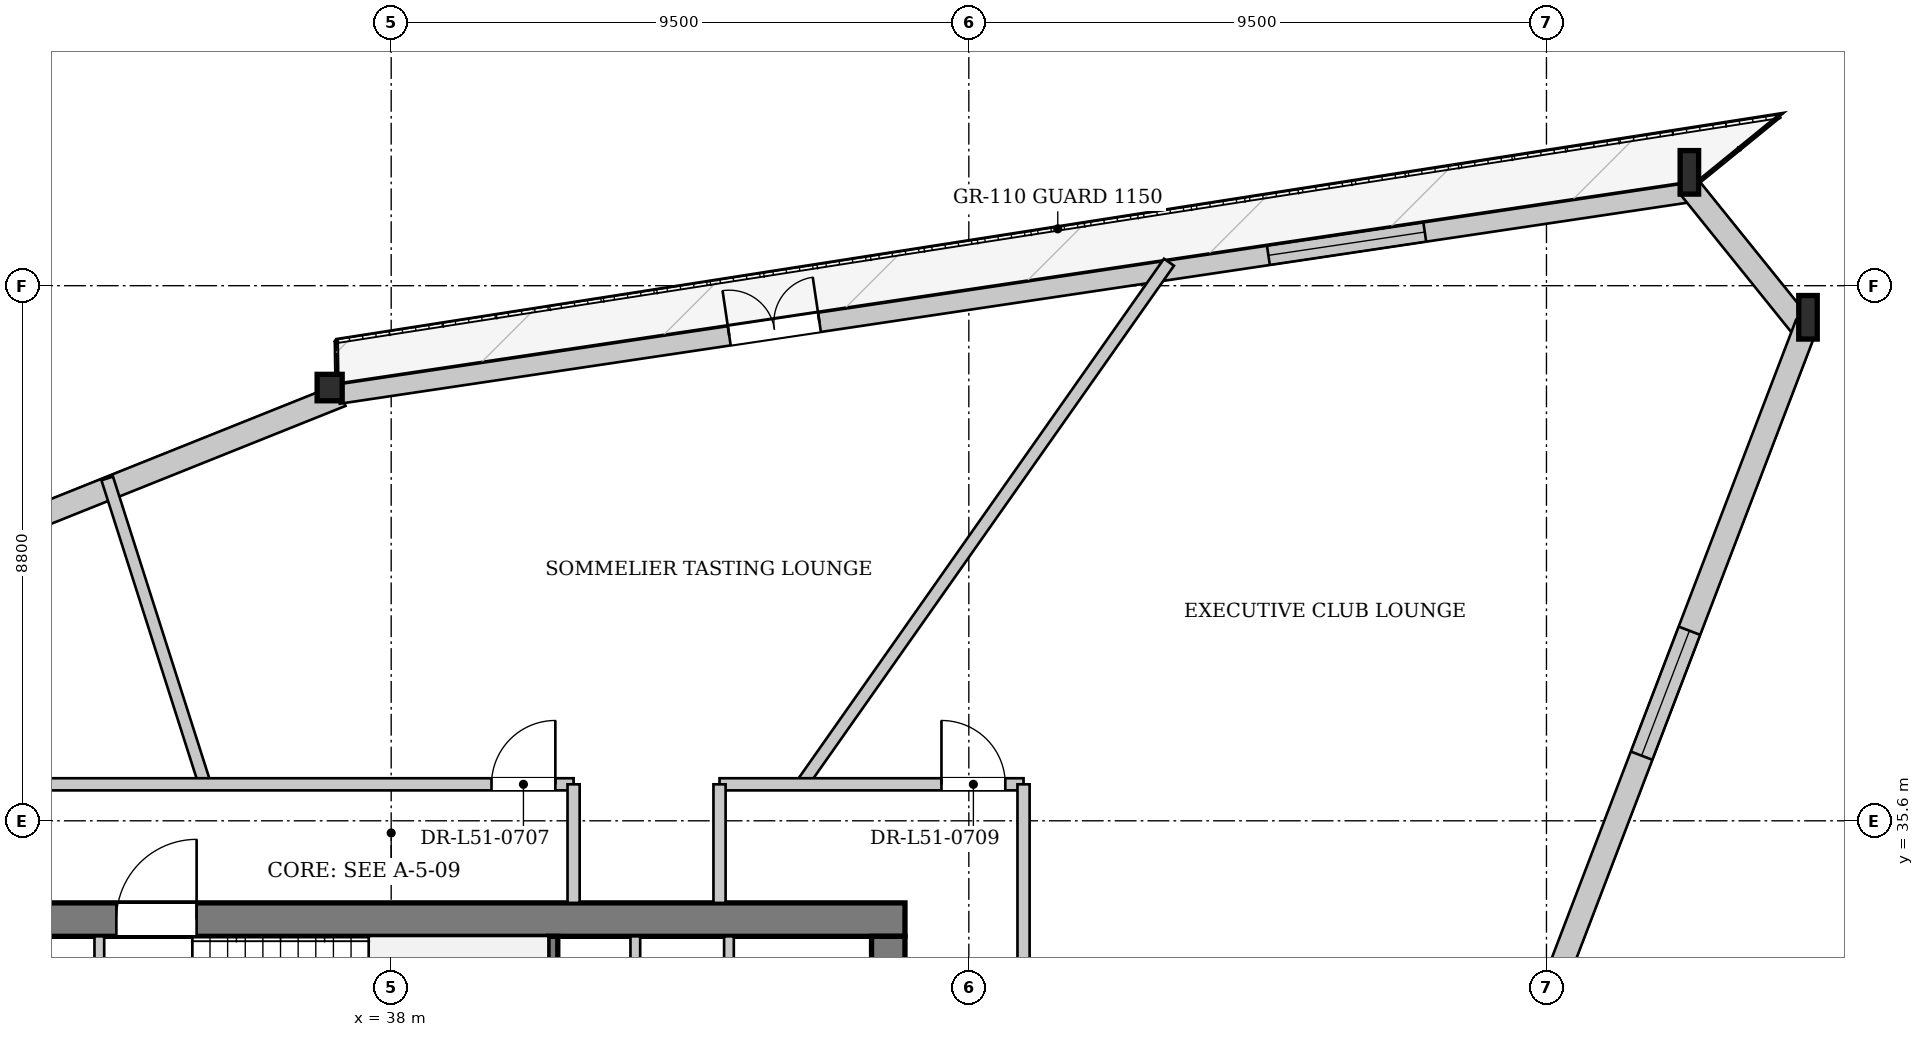
"""IFC4 building model, lengths in metres.
Left out: names, types, materials, properties, quantities, classifications, styles, units other than length and angle.
Written with IfcOpenShell. Run it as: python <this file> out.ifc"""

import sys

from ifc_helpers import new_model, si_unit, direction, frame, frame_2d, origin, origin_2d, place, context, subcontext, project, spatial, rectangle, i_section, extrude, source, transform, mapped, element, fill, save


model = new_model("IFC4")
c1 = context("Model", 3, precision=1e-05, world=origin(), true_north=direction((0.0, 1.0)))
c2 = subcontext(c1, "Body", "Model", "MODEL_VIEW")
j1 = project(units=[si_unit("LENGTHUNIT", "METRE"), si_unit("PLANEANGLEUNIT", "RADIAN")], contexts=[c1])
p1 = place(None, origin())
s1 = spatial("IfcSite", under=j1, at=p1, CompositionType="ELEMENT")
p2 = place(p1, origin())
s2 = spatial("IfcBuilding", under=s1, at=p2, CompositionType="ELEMENT")
p3 = place(p2, frame((0.0, 0.0, 192.75)))
s3 = spatial("IfcBuildingStorey", under=s2, at=p3, CompositionType="ELEMENT", Elevation=192.75)
m1 = source(origin(), c2, "Body", "SweptSolid", [
    extrude(i_section(OverallWidth=0.304, OverallDepth=0.716, WebThickness=0.021, FlangeThickness=0.04, at=origin_2d()), origin(), (0.0, 0.0, 1.0), 3.418),
])
p4 = place(p3, frame((61.46, 43.704, 0.0), z_axis=(-0.092925471989, 0.103067990838, 0.990324111551), x_axis=(-0.742705229141, -0.669618505275, 0.0)))
e1 = element("IfcColumn", 1, at=p4, inside=s3, PredefinedType="COLUMN", context=c2, shape_type="MappedRepresentation", body=[
    mapped(m1, transform((0.0, 0.0, 0.0), x_axis=(1.0, 0.0, 0.0), y_axis=(0.0, 1.0, 0.0), z_axis=(0.0, 0.0, 1.0), scale=1.0)),
])
m2 = source(origin(), c2, "Body", "SweptSolid", [
    extrude(i_section(OverallWidth=0.304, OverallDepth=0.716, WebThickness=0.021, FlangeThickness=0.04, at=origin_2d()), origin(), (0.0, 0.0, 1.0), 3.414),
])
p5 = place(p3, frame((59.516, 46.118, 0.0), z_axis=(-0.096907652623, 0.085607719697, 0.991604873521), x_axis=(-0.662060560161, -0.749450341703, 0.0)))
e2 = element("IfcColumn", 2, at=p5, inside=s3, PredefinedType="COLUMN", context=c2, shape_type="MappedRepresentation", body=[
    mapped(m2, transform((0.0, 0.0, 0.0), x_axis=(1.0, 0.0, 0.0), y_axis=(0.0, 1.0, 0.0), z_axis=(0.0, 0.0, 1.0), scale=1.0)),
])
m3 = source(origin(), c2, "Body", "SweptSolid", [
    extrude(i_section(OverallWidth=0.412, OverallDepth=0.435, WebThickness=0.031, FlangeThickness=0.05, at=origin_2d()), origin(), (0.0, 0.0, 1.0), 3.395),
])
p6 = place(p3, frame((37.108, 42.775, 0.0), z_axis=(-0.070402711924, -0.029843846219, 0.997072115244), x_axis=(0.390284164377, -0.920694450421, 0.0)))
e3 = element("IfcColumn", 3, at=p6, inside=s3, PredefinedType="COLUMN", context=c2, shape_type="MappedRepresentation", body=[
    mapped(m3, transform((0.0, 0.0, 0.0), x_axis=(1.0, 0.0, 0.0), y_axis=(0.0, 1.0, 0.0), z_axis=(0.0, 0.0, 1.0), scale=1.0)),
])
m4 = source(origin(), c2, "Body", "SweptSolid", [
    extrude(i_section(OverallWidth=0.412, OverallDepth=0.435, WebThickness=0.031, FlangeThickness=0.05, at=origin_2d()), origin(), (0.0, 0.0, 1.0), 3.403),
])
p7 = place(p3, frame((57.309, 32.859, 0.0), z_axis=(-0.0480647848, 0.091394829605, 0.994654091423), x_axis=(-0.885068873791, -0.465460082763, 0.0)))
e4 = element("IfcColumn", 4, at=p7, inside=s3, PredefinedType="COLUMN", context=c2, shape_type="MappedRepresentation", body=[
    mapped(m4, transform((0.0, 0.0, 0.0), x_axis=(1.0, 0.0, 0.0), y_axis=(0.0, 1.0, 0.0), z_axis=(0.0, 0.0, 1.0), scale=1.0)),
])
p8 = place(p3, frame((16.146, 34.177, 0.0), z_axis=(0.0, 0.0, 1.0), x_axis=(0.928328726299, 0.371760374339, 0.0)))
e5 = element("IfcWall", 5, at=p8, inside=s3, PredefinedType="SOLIDWALL", context=c2, shape_type="SweptSolid", body=[
    extrude(rectangle(XDim=22.656, YDim=0.38, at=frame_2d((11.328, 0.0))), origin(), (0.0, 0.0, 1.0), 2.722),
])
p9 = place(p8, frame((5.244, 0.0, 0.352)))
e6 = element("IfcOpeningElement", 6, at=p9, cuts=e5, PredefinedType="OPENING", context=c2, shape_type="SweptSolid", body=[
    extrude(rectangle(XDim=2.2, YDim=2.25, at=frame_2d((1.1, 1.125))), frame((0.0, 0.2, 0.0), z_axis=(0.0, -1.0, 0.0), x_axis=(1.0, 0.0, 0.0)), (0.0, 0.0, 1.0), 0.4),
])
p10 = place(p8, frame((15.212, 0.0, 0.352)))
e7 = element("IfcOpeningElement", 7, at=p10, cuts=e5, PredefinedType="OPENING", context=c2, shape_type="SweptSolid", body=[
    extrude(rectangle(XDim=2.2, YDim=2.25, at=frame_2d((1.1, 1.125))), frame((0.0, 0.2, 0.0), z_axis=(0.0, -1.0, 0.0), x_axis=(1.0, 0.0, 0.0)), (0.0, 0.0, 1.0), 0.4),
])
p11 = place(p3, frame((37.131, 42.617, 0.0), z_axis=(0.0, 0.0, 1.0), x_axis=(0.989058686521, 0.147522590195, 0.0)))
e8 = element("IfcWall", 8, at=p11, inside=s3, PredefinedType="SOLIDWALL", context=c2, shape_type="SweptSolid", body=[
    extrude(rectangle(XDim=22.656, YDim=0.32, at=frame_2d((11.328, 0.0))), origin(), (0.0, 0.0, 1.0), 2.722),
])
p12 = place(p11, frame((6.5, 0.0, 0.0)))
e9 = element("IfcOpeningElement", 9, at=p12, cuts=e8, PredefinedType="OPENING", context=c2, shape_type="SweptSolid", body=[
    extrude(rectangle(XDim=1.5, YDim=2.3, at=frame_2d((0.75, 1.15))), frame((0.0, 0.17, 0.0), z_axis=(0.0, -1.0, 0.0), x_axis=(1.0, 0.0, 0.0)), (0.0, 0.0, 1.0), 0.34),
])
p13 = place(p11, frame((15.465, 0.0, 0.252)))
e10 = element("IfcOpeningElement", 10, at=p13, cuts=e8, PredefinedType="OPENING", context=c2, shape_type="SweptSolid", body=[
    extrude(rectangle(XDim=2.6, YDim=2.35, at=frame_2d((1.3, 1.175))), frame((0.0, 0.17, 0.0), z_axis=(0.0, -1.0, 0.0), x_axis=(1.0, 0.0, 0.0)), (0.0, 0.0, 1.0), 0.34),
])
p14 = place(p3, frame((59.368, 45.998, 0.0), z_axis=(0.0, 0.0, 1.0), x_axis=(0.627295033494, -0.778781703017, 0.0)))
e11 = element("IfcWall", 11, at=p14, inside=s3, PredefinedType="SOLIDWALL", context=c2, shape_type="SweptSolid", body=[
    extrude(rectangle(XDim=3.099, YDim=0.38, at=frame_2d((1.55, 0.0))), origin(), (0.0, 0.0, 1.0), 2.722),
])
p15 = place(p3, frame((61.283, 43.772, 0.0), z_axis=(0.0, 0.0, 1.0), x_axis=(-0.357452785868, -0.933931210462, 0.0)))
e12 = element("IfcWall", 12, at=p15, inside=s3, PredefinedType="SOLIDWALL", context=c2, shape_type="SweptSolid", body=[
    extrude(rectangle(XDim=23.224, YDim=0.38, at=frame_2d((11.612, 0.0))), origin(), (0.0, 0.0, 1.0), 2.722),
])
p16 = place(p15, frame((5.403, 0.0, 0.352)))
e13 = element("IfcOpeningElement", 13, at=p16, cuts=e12, PredefinedType="OPENING", context=c2, shape_type="SweptSolid", body=[
    extrude(rectangle(XDim=2.2, YDim=2.25, at=frame_2d((1.1, 1.125))), frame((0.0, 0.2, 0.0), z_axis=(0.0, -1.0, 0.0), x_axis=(1.0, 0.0, 0.0)), (0.0, 0.0, 1.0), 0.4),
])
p17 = place(p15, frame((15.621, 0.0, 0.352)))
e14 = element("IfcOpeningElement", 14, at=p17, cuts=e12, PredefinedType="OPENING", context=c2, shape_type="SweptSolid", body=[
    extrude(rectangle(XDim=2.2, YDim=2.25, at=frame_2d((1.1, 1.125))), frame((0.0, 0.2, 0.0), z_axis=(0.0, -1.0, 0.0), x_axis=(1.0, 0.0, 0.0)), (0.0, 0.0, 1.0), 0.4),
])
p18 = place(p3, frame((29.55, 33.975, 0.0), z_axis=(0.0, 0.0, 1.0), x_axis=(1.0, 0.0, 0.0)))
e15 = element("IfcWall", 15, at=p18, inside=s3, PredefinedType="SHEAR", context=c2, shape_type="SweptSolid", body=[
    extrude(rectangle(XDim=16.9, YDim=0.55, at=frame_2d((8.45, 0.0))), origin(), (0.0, 0.0, 1.0), 3.33),
])
p19 = place(p18, frame((1.55, 0.0, 0.0)))
e16 = element("IfcOpeningElement", 16, at=p19, cuts=e15, PredefinedType="OPENING", context=c2, shape_type="SweptSolid", body=[
    extrude(rectangle(XDim=0.95, YDim=2.1, at=frame_2d((0.475, 1.05))), frame((0.0, 0.285, 0.0), z_axis=(0.0, -1.0, 0.0), x_axis=(1.0, 0.0, 0.0)), (0.0, 0.0, 1.0), 0.57),
])
p20 = place(p18, frame((3.93, 0.0, 0.0)))
e17 = element("IfcOpeningElement", 17, at=p20, cuts=e15, PredefinedType="OPENING", context=c2, shape_type="SweptSolid", body=[
    extrude(rectangle(XDim=1.32, YDim=2.2, at=frame_2d((0.66, 1.1))), frame((0.0, 0.285, 0.0), z_axis=(0.0, -1.0, 0.0), x_axis=(1.0, 0.0, 0.0)), (0.0, 0.0, 1.0), 0.57),
])
p21 = place(p3, frame((46.175, 33.7, 0.0), z_axis=(0.0, 0.0, 1.0), x_axis=(0.0, -1.0, 0.0)))
e18 = element("IfcWall", 18, at=p21, inside=s3, PredefinedType="SHEAR", context=c2, shape_type="SweptSolid", body=[
    extrude(rectangle(XDim=14.2, YDim=0.55, at=frame_2d((7.1, 0.0))), origin(), (0.0, 0.0, 1.0), 3.33),
])
p22 = place(p21, frame((5.18, 0.0, 0.0)))
e19 = element("IfcOpeningElement", 19, at=p22, cuts=e18, PredefinedType="OPENING", context=c2, shape_type="SweptSolid", body=[
    extrude(rectangle(XDim=1.6, YDim=2.2, at=frame_2d((0.8, 1.1))), frame((0.0, 0.285, 0.0), z_axis=(0.0, -1.0, 0.0), x_axis=(1.0, 0.0, 0.0)), (0.0, 0.0, 1.0), 0.57),
])
p23 = place(p21, frame((2.05, 0.0, 0.0)))
e20 = element("IfcOpeningElement", 20, at=p23, cuts=e18, PredefinedType="OPENING", context=c2, shape_type="SweptSolid", body=[
    extrude(rectangle(XDim=0.95, YDim=2.1, at=frame_2d((0.475, 1.05))), frame((0.0, 0.285, 0.0), z_axis=(0.0, -1.0, 0.0), x_axis=(1.0, 0.0, 0.0)), (0.0, 0.0, 1.0), 0.57),
])
p24 = place(p3, frame((40.66, 30.6, 0.0), z_axis=(0.0, 0.0, 1.0), x_axis=(0.0, 1.0, 0.0)))
e21 = element("IfcWall", 21, at=p24, inside=s3, PredefinedType="PARTITIONING", context=c2, shape_type="SweptSolid", body=[
    extrude(rectangle(XDim=3.1, YDim=0.16, at=frame_2d((1.55, 0.0))), origin(), (0.0, 0.0, 1.0), 3.33),
])
p25 = place(p3, frame((33.2, 28.44, 0.0), z_axis=(0.0, 0.0, 1.0), x_axis=(0.0, 1.0, 0.0)))
e22 = element("IfcWall", 22, at=p25, inside=s3, PredefinedType="PARTITIONING", context=c2, shape_type="SweptSolid", body=[
    extrude(rectangle(XDim=5.26, YDim=0.16, at=frame_2d((2.63, 0.0))), origin(), (0.0, 0.0, 1.0), 3.33),
])
p26 = place(p3, frame((42.015, 30.68, 0.0), z_axis=(0.0, 0.0, 1.0), x_axis=(0.0, 1.0, 0.0)))
e23 = element("IfcWall", 23, at=p26, inside=s3, PredefinedType="PARTITIONING", context=c2, shape_type="SweptSolid", body=[
    extrude(rectangle(XDim=3.02, YDim=0.16, at=frame_2d((1.51, 0.0))), origin(), (0.0, 0.0, 1.0), 3.33),
])
p27 = place(p26, frame((0.95, 0.0, 0.0)))
e24 = element("IfcOpeningElement", 24, at=p27, cuts=e23, PredefinedType="OPENING", context=c2, shape_type="SweptSolid", body=[
    extrude(rectangle(XDim=0.95, YDim=2.1, at=frame_2d((0.475, 1.05))), frame((0.0, 0.09, 0.0), z_axis=(0.0, -1.0, 0.0), x_axis=(1.0, 0.0, 0.0)), (0.0, 0.0, 1.0), 0.18),
])
p28 = place(p3, frame((43.555, 30.68, 0.0), z_axis=(0.0, 0.0, 1.0), x_axis=(0.0, 1.0, 0.0)))
e25 = element("IfcWall", 25, at=p28, inside=s3, PredefinedType="PARTITIONING", context=c2, shape_type="SweptSolid", body=[
    extrude(rectangle(XDim=3.02, YDim=0.16, at=frame_2d((1.51, 0.0))), origin(), (0.0, 0.0, 1.0), 3.33),
])
p29 = place(p28, frame((0.95, 0.0, 0.0)))
e26 = element("IfcOpeningElement", 26, at=p29, cuts=e25, PredefinedType="OPENING", context=c2, shape_type="SweptSolid", body=[
    extrude(rectangle(XDim=0.95, YDim=2.1, at=frame_2d((0.475, 1.05))), frame((0.0, 0.09, 0.0), z_axis=(0.0, -1.0, 0.0), x_axis=(1.0, 0.0, 0.0)), (0.0, 0.0, 1.0), 0.18),
])
p30 = place(p3, frame((44.752, 36.2, 0.0), z_axis=(0.0, 0.0, 1.0), x_axis=(0.5753136503, 0.817932884642, 0.0)))
e27 = element("IfcWall", 27, at=p30, inside=s3, PredefinedType="PARTITIONING", context=c2, shape_type="SweptSolid", body=[
    extrude(rectangle(XDim=10.497, YDim=0.2, at=frame_2d((5.249, 0.0))), origin(), (0.0, 0.0, 1.0), 3.33),
])
p31 = place(p3, frame((34.935, 36.2, 0.0), z_axis=(0.0, 0.0, 1.0), x_axis=(-0.304092848706, 0.952642398472, 0.0)))
e28 = element("IfcWall", 28, at=p31, inside=s3, PredefinedType="PARTITIONING", context=c2, shape_type="SweptSolid", body=[
    extrude(rectangle(XDim=5.28, YDim=0.2, at=frame_2d((2.64, 0.0))), origin(), (0.0, 0.0, 1.0), 3.33),
])
p32 = place(p3, frame((27.6, 36.2, 0.0), z_axis=(0.0, 0.0, 1.0), x_axis=(1.0, 0.0, 0.0)))
e29 = element("IfcWall", 29, at=p32, inside=s3, PredefinedType="PARTITIONING", context=c2, shape_type="SweptSolid", body=[
    extrude(rectangle(XDim=13.4, YDim=0.2, at=frame_2d((6.7, 0.0))), origin(), (0.0, 0.0, 1.0), 3.33),
])
p33 = place(p32, frame((12.05, 0.0, 0.0)))
e30 = element("IfcOpeningElement", 30, at=p33, cuts=e29, PredefinedType="OPENING", context=c2, shape_type="SweptSolid", body=[
    extrude(rectangle(XDim=1.05, YDim=2.2, at=frame_2d((0.525, 1.1))), frame((0.0, 0.11, 0.0), z_axis=(0.0, -1.0, 0.0), x_axis=(1.0, 0.0, 0.0)), (0.0, 0.0, 1.0), 0.22),
])
p34 = place(p32, frame((0.3, 0.0, 0.0)))
e31 = element("IfcOpeningElement", 31, at=p34, cuts=e29, PredefinedType="OPENING", context=c2, shape_type="SweptSolid", body=[
    extrude(rectangle(XDim=1.05, YDim=2.2, at=frame_2d((0.525, 1.1))), frame((0.0, 0.11, 0.0), z_axis=(0.0, -1.0, 0.0), x_axis=(1.0, 0.0, 0.0)), (0.0, 0.0, 1.0), 0.22),
])
p35 = place(p3, frame((41.0, 34.25, 0.0), z_axis=(0.0, 0.0, 1.0), x_axis=(0.0, 1.0, 0.0)))
e32 = element("IfcWall", 32, at=p35, inside=s3, PredefinedType="PARTITIONING", context=c2, shape_type="SweptSolid", body=[
    extrude(rectangle(XDim=1.95, YDim=0.2, at=frame_2d((0.975, 0.0))), origin(), (0.0, 0.0, 1.0), 3.33),
])
p36 = place(p3, frame((43.4, 36.2, 0.0), z_axis=(0.0, 0.0, 1.0), x_axis=(1.0, 0.0, 0.0)))
e33 = element("IfcWall", 33, at=p36, inside=s3, PredefinedType="PARTITIONING", context=c2, shape_type="SweptSolid", body=[
    extrude(rectangle(XDim=5.0, YDim=0.2, at=frame_2d((2.5, 0.0))), origin(), (0.0, 0.0, 1.0), 3.33),
])
p37 = place(p36, frame((3.65, 0.0, 0.0)))
e34 = element("IfcOpeningElement", 34, at=p37, cuts=e33, PredefinedType="OPENING", context=c2, shape_type="SweptSolid", body=[
    extrude(rectangle(XDim=1.05, YDim=2.2, at=frame_2d((0.525, 1.1))), frame((0.0, 0.11, 0.0), z_axis=(0.0, -1.0, 0.0), x_axis=(1.0, 0.0, 0.0)), (0.0, 0.0, 1.0), 0.22),
])
p38 = place(p3, frame((43.4, 34.25, 0.0), z_axis=(0.0, 0.0, 1.0), x_axis=(0.0, 1.0, 0.0)))
e35 = element("IfcWall", 35, at=p38, inside=s3, PredefinedType="PARTITIONING", context=c2, shape_type="SweptSolid", body=[
    extrude(rectangle(XDim=1.95, YDim=0.2, at=frame_2d((0.975, 0.0))), origin(), (0.0, 0.0, 1.0), 3.33),
])
p39 = place(p3, frame((48.4, 17.0, 0.0), z_axis=(0.0, 0.0, 1.0), x_axis=(0.0, 1.0, 0.0)))
e36 = element("IfcWall", 36, at=p39, inside=s3, PredefinedType="PARTITIONING", context=c2, shape_type="SweptSolid", body=[
    extrude(rectangle(XDim=19.2, YDim=0.2, at=frame_2d((9.6, 0.0))), origin(), (0.0, 0.0, 1.0), 3.33),
])
m5 = source(origin(), c2, "Body", "SweptSolid", [
    extrude(rectangle(XDim=1.5, YDim=2.3, at=frame_2d((0.75, 1.15))), frame((0.0, 0.025, 0.0), z_axis=(0.0, -1.0, 0.0), x_axis=(1.0, 0.0, 0.0)), (0.0, 0.0, 1.0), 0.05),
])
p40 = place(p12, origin())
e37 = element("IfcDoor", 37, at=p40, inside=s3, OperationType="DOUBLE_DOOR_SINGLE_SWING", PredefinedType="DOOR", context=c2, shape_type="MappedRepresentation", body=[
    mapped(m5, transform((0.0, 0.0, 0.0), x_axis=(1.0, 0.0, 0.0), y_axis=(0.0, 1.0, 0.0), z_axis=(0.0, 0.0, 1.0), scale=1.0)),
])
fill(e9, e37)
m6 = source(origin(), c2, "Body", "SweptSolid", [
    extrude(rectangle(XDim=2.6, YDim=2.35, at=frame_2d((1.3, 1.175))), frame((0.0, 0.03, 0.0), z_axis=(0.0, -1.0, 0.0), x_axis=(1.0, 0.0, 0.0)), (0.0, 0.0, 1.0), 0.06),
])
p41 = place(p13, origin())
e38 = element("IfcWindow", 38, at=p41, inside=s3, PartitioningType="SINGLE_PANEL", PredefinedType="WINDOW", context=c2, shape_type="MappedRepresentation", body=[
    mapped(m6, transform((0.0, 0.0, 0.0), x_axis=(1.0, 0.0, 0.0), y_axis=(0.0, 1.0, 0.0), z_axis=(0.0, 0.0, 1.0), scale=1.0)),
])
fill(e10, e38)
m7 = source(origin(), c2, "Body", "SweptSolid", [
    extrude(rectangle(XDim=2.2, YDim=2.25, at=frame_2d((1.1, 1.125))), frame((0.0, 0.03, 0.0), z_axis=(0.0, -1.0, 0.0), x_axis=(1.0, 0.0, 0.0)), (0.0, 0.0, 1.0), 0.06),
])
p42 = place(p16, origin())
e39 = element("IfcWindow", 39, at=p42, inside=s3, PartitioningType="SINGLE_PANEL", PredefinedType="WINDOW", context=c2, shape_type="MappedRepresentation", body=[
    mapped(m7, transform((0.0, 0.0, 0.0), x_axis=(1.0, 0.0, 0.0), y_axis=(0.0, 1.0, 0.0), z_axis=(0.0, 0.0, 1.0), scale=1.0)),
])
fill(e13, e39)
m8 = source(origin(), c2, "Body", "SweptSolid", [
    extrude(rectangle(XDim=1.32, YDim=2.2, at=frame_2d((0.66, 1.1))), frame((0.0, 0.025, 0.0), z_axis=(0.0, -1.0, 0.0), x_axis=(1.0, 0.0, 0.0)), (0.0, 0.0, 1.0), 0.05),
])
p43 = place(p20, origin())
e40 = element("IfcDoor", 40, at=p43, inside=s3, OperationType="SINGLE_SWING_RIGHT", PredefinedType="DOOR", context=c2, shape_type="MappedRepresentation", body=[
    mapped(m8, transform((0.0, 0.0, 0.0), x_axis=(1.0, 0.0, 0.0), y_axis=(0.0, 1.0, 0.0), z_axis=(0.0, 0.0, 1.0), scale=1.0)),
])
fill(e17, e40)
m9 = source(origin(), c2, "Body", "SweptSolid", [
    extrude(rectangle(XDim=1.05, YDim=2.2, at=frame_2d((0.525, 1.1))), frame((0.0, 0.025, 0.0), z_axis=(0.0, -1.0, 0.0), x_axis=(1.0, 0.0, 0.0)), (0.0, 0.0, 1.0), 0.05),
])
p44 = place(p33, origin())
e41 = element("IfcDoor", 41, at=p44, inside=s3, OperationType="SINGLE_SWING_RIGHT", PredefinedType="DOOR", context=c2, shape_type="MappedRepresentation", body=[
    mapped(m9, transform((0.0, 0.0, 0.0), x_axis=(1.0, 0.0, 0.0), y_axis=(0.0, 1.0, 0.0), z_axis=(0.0, 0.0, 1.0), scale=1.0)),
])
fill(e30, e41)
p45 = place(p37, origin())
e42 = element("IfcDoor", 42, at=p45, inside=s3, OperationType="SINGLE_SWING_LEFT", PredefinedType="DOOR", context=c2, shape_type="MappedRepresentation", body=[
    mapped(m9, transform((0.0, 0.0, 0.0), x_axis=(1.0, 0.0, 0.0), y_axis=(0.0, 1.0, 0.0), z_axis=(0.0, 0.0, 1.0), scale=1.0)),
])
fill(e34, e42)
save(model, sys.argv[1])
